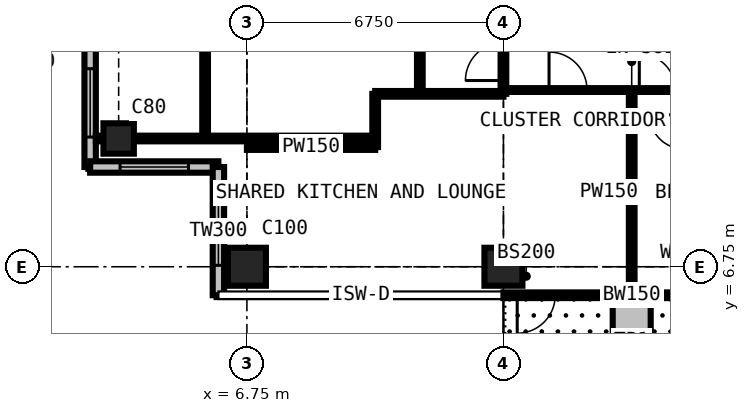
"""IFC4 building model, lengths in metres.
Left out: names, types, materials, properties, quantities, classifications, styles, units other than length and angle.
Written with IfcOpenShell. Run it as: python <this file> out.ifc"""

import sys

from ifc_helpers import new_model, si_unit, direction, frame, frame_2d, origin, origin_2d, place, context, subcontext, project, spatial, rectangle, extrude, element, fill, save


model = new_model("IFC4")
c1 = context("Model", 3, precision=1e-05, world=origin(), true_north=direction((0.0, 1.0)))
c2 = subcontext(c1, "Body", "Model", "MODEL_VIEW")
j1 = project(units=[si_unit("LENGTHUNIT", "METRE"), si_unit("PLANEANGLEUNIT", "RADIAN")], contexts=[c1])
p1 = place(None, origin())
s1 = spatial("IfcSite", under=j1, at=p1, CompositionType="ELEMENT")
p2 = place(p1, origin())
s2 = spatial("IfcBuilding", under=s1, at=p2, CompositionType="ELEMENT")
p3 = place(p2, frame((0.0, 0.0, 233.1)))
s3 = spatial("IfcBuildingStorey", under=s2, at=p3, CompositionType="ELEMENT", Elevation=233.1)
p4 = place(p3, frame((3.375, 10.125, 0.0), z_axis=(0.0, 0.0, 1.0), x_axis=(1.0, 0.0, 0.0)))
e1 = element("IfcColumn", 1, at=p4, inside=s3, PredefinedType="COLUMN", context=c2, shape_type="SweptSolid", body=[
    extrude(rectangle(XDim=0.8, YDim=0.8, at=origin_2d()), origin(), (0.0, 0.0, 1.0), 3.6),
])
for number, where, z_axis, x_axis in (
    (2, (6.75, 6.75, 0.0), (0.0, 0.0, 1.0), (1.0, 0.0, 0.0)),
    (3, (13.5, 6.75, 0.0), (0.0, 0.0, 1.0), (1.0, 0.0, 0.0)),
):
    element("IfcColumn", number, at=place(p3, frame(where, z_axis=z_axis, x_axis=x_axis)), inside=s3, PredefinedType="COLUMN", context=c2, shape_type="SweptSolid", body=[
        extrude(rectangle(XDim=1.0, YDim=1.0, at=origin_2d()), origin(), (0.0, 0.0, 1.0), 3.6),
    ])
p5 = place(p3, frame((2.625, 12.75, 0.0), z_axis=(0.0, 0.0, 1.0), x_axis=(0.0, -1.0, 0.0)))
e4 = element("IfcWall", 4, at=p5, inside=s3, PredefinedType="SOLIDWALL", context=c2, shape_type="SweptSolid", body=[
    extrude(rectangle(XDim=3.375, YDim=0.3, at=frame_2d((1.688, 0.0))), origin(), (0.0, 0.0, 1.0), 3.375),
])
p6 = place(p5, frame((0.788, 0.0, 0.6)))
e5 = element("IfcOpeningElement", 5, at=p6, cuts=e4, PredefinedType="OPENING", context=c2, shape_type="SweptSolid", body=[
    extrude(rectangle(XDim=1.8, YDim=2.1, at=frame_2d((0.9, 1.05))), frame((0.0, 0.16, 0.0), z_axis=(0.0, -1.0, 0.0), x_axis=(1.0, 0.0, 0.0)), (0.0, 0.0, 1.0), 0.32),
])
p7 = place(p3, frame((2.625, 9.375, 0.0), z_axis=(0.0, 0.0, 1.0), x_axis=(1.0, 0.0, 0.0)))
e6 = element("IfcWall", 6, at=p7, inside=s3, PredefinedType="SOLIDWALL", context=c2, shape_type="SweptSolid", body=[
    extrude(rectangle(XDim=3.375, YDim=0.3, at=frame_2d((1.688, 0.0))), origin(), (0.0, 0.0, 1.0), 3.375),
])
p8 = place(p7, frame((0.788, 0.0, 0.6)))
e7 = element("IfcOpeningElement", 7, at=p8, cuts=e6, PredefinedType="OPENING", context=c2, shape_type="SweptSolid", body=[
    extrude(rectangle(XDim=1.8, YDim=2.1, at=frame_2d((0.9, 1.05))), frame((0.0, 0.16, 0.0), z_axis=(0.0, -1.0, 0.0), x_axis=(1.0, 0.0, 0.0)), (0.0, 0.0, 1.0), 0.32),
])
p9 = place(p3, frame((6.0, 9.375, 0.0), z_axis=(0.0, 0.0, 1.0), x_axis=(0.0, -1.0, 0.0)))
e8 = element("IfcWall", 8, at=p9, inside=s3, PredefinedType="SOLIDWALL", context=c2, shape_type="SweptSolid", body=[
    extrude(rectangle(XDim=3.375, YDim=0.3, at=frame_2d((1.688, 0.0))), origin(), (0.0, 0.0, 1.0), 3.375),
])
p10 = place(p9, frame((0.788, 0.0, 0.6)))
e9 = element("IfcOpeningElement", 9, at=p10, cuts=e8, PredefinedType="OPENING", context=c2, shape_type="SweptSolid", body=[
    extrude(rectangle(XDim=1.8, YDim=2.1, at=frame_2d((0.9, 1.05))), frame((0.0, 0.16, 0.0), z_axis=(0.0, -1.0, 0.0), x_axis=(1.0, 0.0, 0.0)), (0.0, 0.0, 1.0), 0.32),
])
p11 = place(p3, frame((20.25, 6.0, 0.0), z_axis=(0.0, 0.0, 1.0), x_axis=(-1.0, 0.0, 0.0)))
e10 = element("IfcWall", 10, at=p11, inside=s3, PredefinedType="SOLIDWALL", context=c2, shape_type="SweptSolid", body=[
    extrude(rectangle(XDim=6.75, YDim=0.15, at=frame_2d((3.375, 0.0))), origin(), (0.0, 0.0, 1.0), 3.375),
])
p12 = place(p11, frame((0.363, 0.0, 0.0)))
e11 = element("IfcOpeningElement", 11, at=p12, cuts=e10, PredefinedType="OPENING", context=c2, shape_type="SweptSolid", body=[
    extrude(rectangle(XDim=1.0, YDim=2.2, at=frame_2d((0.5, 1.1))), frame((0.0, 0.085, 0.0), z_axis=(0.0, -1.0, 0.0), x_axis=(1.0, 0.0, 0.0)), (0.0, 0.0, 1.0), 0.17),
])
p13 = place(p11, frame((1.725, 0.0, 0.9)))
e12 = element("IfcOpeningElement", 12, at=p13, cuts=e10, PredefinedType="OPENING", context=c2, shape_type="SweptSolid", body=[
    extrude(rectangle(XDim=1.2, YDim=1.8, at=frame_2d((0.6, 0.9))), frame((0.0, 0.085, 0.0), z_axis=(0.0, -1.0, 0.0), x_axis=(1.0, 0.0, 0.0)), (0.0, 0.0, 1.0), 0.17),
])
p14 = place(p11, frame((5.387, 0.0, 0.0)))
e13 = element("IfcOpeningElement", 13, at=p14, cuts=e10, PredefinedType="OPENING", context=c2, shape_type="SweptSolid", body=[
    extrude(rectangle(XDim=1.0, YDim=2.2, at=frame_2d((0.5, 1.1))), frame((0.0, 0.085, 0.0), z_axis=(0.0, -1.0, 0.0), x_axis=(1.0, 0.0, 0.0)), (0.0, 0.0, 1.0), 0.17),
])
p15 = place(p11, frame((3.825, 0.0, 0.9)))
e14 = element("IfcOpeningElement", 14, at=p15, cuts=e10, PredefinedType="OPENING", context=c2, shape_type="SweptSolid", body=[
    extrude(rectangle(XDim=1.2, YDim=1.8, at=frame_2d((0.6, 0.9))), frame((0.0, 0.085, 0.0), z_axis=(0.0, -1.0, 0.0), x_axis=(1.0, 0.0, 0.0)), (0.0, 0.0, 1.0), 0.17),
])
p16 = place(p3, frame((16.875, 5.9, 0.0), z_axis=(0.0, 0.0, 1.0), x_axis=(0.0, -1.0, 0.0)))
e15 = element("IfcWall", 15, at=p16, inside=s3, PredefinedType="USERDEFINED", context=c2, shape_type="SweptSolid", body=[
    extrude(rectangle(XDim=2.2, YDim=1.0, at=frame_2d((1.1, 0.0))), origin(), (0.0, 0.0, 1.0), 0.9),
])
p17 = place(p3, frame((2.775, 10.125, 0.0), z_axis=(0.0, 0.0, 1.0), x_axis=(1.0, 0.0, 0.0)))
e16 = element("IfcWall", 16, at=p17, inside=s3, PredefinedType="PARTITIONING", context=c2, shape_type="SweptSolid", body=[
    extrude(rectangle(XDim=7.35, YDim=0.15, at=frame_2d((3.675, 0.0))), origin(), (0.0, 0.0, 1.0), 2.877),
])
p18 = place(p3, frame((5.65, 10.125, 0.0), z_axis=(0.0, 0.0, 1.0), x_axis=(0.0, 1.0, 0.0)))
e17 = element("IfcWall", 17, at=p18, inside=s3, PredefinedType="PARTITIONING", context=c2, shape_type="SweptSolid", body=[
    extrude(rectangle(XDim=10.762, YDim=0.15, at=frame_2d((5.381, 0.0))), origin(), (0.0, 0.0, 1.0), 3.375),
])
p19 = place(p18, frame((4.9, 0.0, 0.0)))
e18 = element("IfcOpeningElement", 18, at=p19, cuts=e17, PredefinedType="OPENING", context=c2, shape_type="SweptSolid", body=[
    extrude(rectangle(XDim=0.95, YDim=2.2, at=frame_2d((0.475, 1.1))), frame((0.0, 0.085, 0.0), z_axis=(0.0, -1.0, 0.0), x_axis=(1.0, 0.0, 0.0)), (0.0, 0.0, 1.0), 0.17),
])
p20 = place(p3, frame((6.75, 9.9, 0.0), z_axis=(0.0, 0.0, 1.0), x_axis=(1.0, 0.0, 0.0)))
e19 = element("IfcWall", 19, at=p20, inside=s3, PredefinedType="PARTITIONING", context=c2, shape_type="SweptSolid", body=[
    extrude(rectangle(XDim=3.375, YDim=0.15, at=frame_2d((1.688, 0.0))), origin(), (0.0, 0.0, 1.0), 3.375),
])
p21 = place(p3, frame((10.125, 9.9, 0.0), z_axis=(0.0, 0.0, 1.0), x_axis=(0.0, 1.0, 0.0)))
e20 = element("IfcWall", 20, at=p21, inside=s3, PredefinedType="PARTITIONING", context=c2, shape_type="SweptSolid", body=[
    extrude(rectangle(XDim=1.4, YDim=0.15, at=frame_2d((0.7, 0.0))), origin(), (0.0, 0.0, 1.0), 3.375),
])
p22 = place(p3, frame((10.125, 11.3, 0.0), z_axis=(0.0, 0.0, 1.0), x_axis=(1.0, 0.0, 0.0)))
e21 = element("IfcWall", 21, at=p22, inside=s3, PredefinedType="PARTITIONING", context=c2, shape_type="SweptSolid", body=[
    extrude(rectangle(XDim=3.375, YDim=0.15, at=frame_2d((1.688, 0.0))), origin(), (0.0, 0.0, 1.0), 3.375),
])
p23 = place(p3, frame((11.3, 11.3, 0.0), z_axis=(0.0, 0.0, 1.0), x_axis=(0.0, 1.0, 0.0)))
e22 = element("IfcWall", 22, at=p23, inside=s3, PredefinedType="PARTITIONING", context=c2, shape_type="SweptSolid", body=[
    extrude(rectangle(XDim=19.3, YDim=0.15, at=frame_2d((9.65, 0.0))), origin(), (0.0, 0.0, 1.0), 3.375),
])
p24 = place(p23, frame((18.1, 0.0, 0.0)))
e23 = element("IfcOpeningElement", 23, at=p24, cuts=e22, PredefinedType="OPENING", context=c2, shape_type="SweptSolid", body=[
    extrude(rectangle(XDim=1.0, YDim=2.2, at=frame_2d((0.5, 1.1))), frame((0.0, 0.085, 0.0), z_axis=(0.0, -1.0, 0.0), x_axis=(1.0, 0.0, 0.0)), (0.0, 0.0, 1.0), 0.17),
])
p25 = place(p23, frame((10.137, 0.0, 0.0)))
e24 = element("IfcOpeningElement", 24, at=p25, cuts=e22, PredefinedType="OPENING", context=c2, shape_type="SweptSolid", body=[
    extrude(rectangle(XDim=1.0, YDim=2.2, at=frame_2d((0.5, 1.1))), frame((0.0, 0.085, 0.0), z_axis=(0.0, -1.0, 0.0), x_axis=(1.0, 0.0, 0.0)), (0.0, 0.0, 1.0), 0.17),
])
p26 = place(p3, frame((13.5, 11.3, 0.0), z_axis=(0.0, 0.0, 1.0), x_axis=(0.0, 1.0, 0.0)))
e25 = element("IfcWall", 25, at=p26, inside=s3, PredefinedType="PARTITIONING", context=c2, shape_type="SweptSolid", body=[
    extrude(rectangle(XDim=1.6, YDim=0.15, at=frame_2d((0.8, 0.0))), origin(), (0.0, 0.0, 1.0), 2.877),
])
p27 = place(p26, frame((0.35, 0.0, 0.0)))
e26 = element("IfcOpeningElement", 26, at=p27, cuts=e25, PredefinedType="OPENING", context=c2, shape_type="SweptSolid", body=[
    extrude(rectangle(XDim=1.0, YDim=2.2, at=frame_2d((0.5, 1.1))), frame((0.0, 0.085, 0.0), z_axis=(0.0, -1.0, 0.0), x_axis=(1.0, 0.0, 0.0)), (0.0, 0.0, 1.0), 0.17),
])
p28 = place(p3, frame((13.5, 11.4, 0.0), z_axis=(0.0, 0.0, 1.0), x_axis=(1.0, 0.0, 0.0)))
e27 = element("IfcWall", 27, at=p28, inside=s3, PredefinedType="PARTITIONING", context=c2, shape_type="SweptSolid", body=[
    extrude(rectangle(XDim=10.125, YDim=0.1, at=frame_2d((5.062, 0.0))), origin(), (0.0, 0.0, 1.0), 3.375),
])
p29 = place(p28, frame((1.2, 0.0, 0.0)))
e28 = element("IfcOpeningElement", 28, at=p29, cuts=e27, PredefinedType="OPENING", context=c2, shape_type="SweptSolid", body=[
    extrude(rectangle(XDim=1.0, YDim=2.2, at=frame_2d((0.5, 1.1))), frame((0.0, 0.06, 0.0), z_axis=(0.0, -1.0, 0.0), x_axis=(1.0, 0.0, 0.0)), (0.0, 0.0, 1.0), 0.12),
])
p30 = place(p28, frame((3.575, 0.0, 0.0)))
e29 = element("IfcOpeningElement", 29, at=p30, cuts=e27, PredefinedType="OPENING", context=c2, shape_type="SweptSolid", body=[
    extrude(rectangle(XDim=0.95, YDim=2.2, at=frame_2d((0.475, 1.1))), frame((0.0, 0.06, 0.0), z_axis=(0.0, -1.0, 0.0), x_axis=(1.0, 0.0, 0.0)), (0.0, 0.0, 1.0), 0.12),
])
p31 = place(p28, frame((6.95, 0.0, 0.0)))
e30 = element("IfcOpeningElement", 30, at=p31, cuts=e27, PredefinedType="OPENING", context=c2, shape_type="SweptSolid", body=[
    extrude(rectangle(XDim=0.95, YDim=2.2, at=frame_2d((0.475, 1.1))), frame((0.0, 0.06, 0.0), z_axis=(0.0, -1.0, 0.0), x_axis=(1.0, 0.0, 0.0)), (0.0, 0.0, 1.0), 0.12),
])
p32 = place(p3, frame((16.875, 6.016, 0.0), z_axis=(0.0, 0.0, 1.0), x_axis=(0.0, 1.0, 0.0)))
e31 = element("IfcWall", 31, at=p32, inside=s3, PredefinedType="PARTITIONING", context=c2, shape_type="SweptSolid", body=[
    extrude(rectangle(XDim=5.384, YDim=0.15, at=frame_2d((2.692, 0.0))), origin(), (0.0, 0.0, 1.0), 3.375),
])
p33 = place(p6, origin())
e32 = element("IfcWindow", 32, at=p33, inside=s3, PartitioningType="SINGLE_PANEL", PredefinedType="WINDOW", context=c2, shape_type="SweptSolid", body=[
    extrude(rectangle(XDim=1.8, YDim=2.1, at=frame_2d((0.9, 1.05))), frame((0.0, 0.03, 0.0), z_axis=(0.0, -1.0, 0.0), x_axis=(1.0, 0.0, 0.0)), (0.0, 0.0, 1.0), 0.06),
])
fill(e5, e32)
p34 = place(p8, origin())
e33 = element("IfcWindow", 33, at=p34, inside=s3, PartitioningType="SINGLE_PANEL", PredefinedType="WINDOW", context=c2, shape_type="SweptSolid", body=[
    extrude(rectangle(XDim=1.8, YDim=2.1, at=frame_2d((0.9, 1.05))), frame((0.0, 0.03, 0.0), z_axis=(0.0, -1.0, 0.0), x_axis=(1.0, 0.0, 0.0)), (0.0, 0.0, 1.0), 0.06),
])
fill(e7, e33)
p35 = place(p10, origin())
e34 = element("IfcWindow", 34, at=p35, inside=s3, PartitioningType="SINGLE_PANEL", PredefinedType="WINDOW", context=c2, shape_type="SweptSolid", body=[
    extrude(rectangle(XDim=1.8, YDim=2.1, at=frame_2d((0.9, 1.05))), frame((0.0, 0.03, 0.0), z_axis=(0.0, -1.0, 0.0), x_axis=(1.0, 0.0, 0.0)), (0.0, 0.0, 1.0), 0.06),
])
fill(e9, e34)
p36 = place(p13, origin())
e35 = element("IfcWindow", 35, at=p36, inside=s3, PartitioningType="SINGLE_PANEL", PredefinedType="WINDOW", context=c2, shape_type="SweptSolid", body=[
    extrude(rectangle(XDim=1.2, YDim=1.8, at=frame_2d((0.6, 0.9))), frame((0.0, 0.03, 0.0), z_axis=(0.0, -1.0, 0.0), x_axis=(1.0, 0.0, 0.0)), (0.0, 0.0, 1.0), 0.06),
])
fill(e12, e35)
p37 = place(p14, origin())
e36 = element("IfcDoor", 36, at=p37, inside=s3, OperationType="SINGLE_SWING_RIGHT", PredefinedType="DOOR", context=c2, shape_type="SweptSolid", body=[
    extrude(rectangle(XDim=1.0, YDim=2.2, at=frame_2d((0.5, 1.1))), frame((0.0, 0.025, 0.0), z_axis=(0.0, -1.0, 0.0), x_axis=(1.0, 0.0, 0.0)), (0.0, 0.0, 1.0), 0.05),
])
fill(e13, e36)
p38 = place(p15, origin())
e37 = element("IfcWindow", 37, at=p38, inside=s3, PartitioningType="SINGLE_PANEL", PredefinedType="WINDOW", context=c2, shape_type="SweptSolid", body=[
    extrude(rectangle(XDim=1.2, YDim=1.8, at=frame_2d((0.6, 0.9))), frame((0.0, 0.03, 0.0), z_axis=(0.0, -1.0, 0.0), x_axis=(1.0, 0.0, 0.0)), (0.0, 0.0, 1.0), 0.06),
])
fill(e14, e37)
p39 = place(p29, origin())
e38 = element("IfcDoor", 38, at=p39, inside=s3, OperationType="SINGLE_SWING_LEFT", PredefinedType="DOOR", context=c2, shape_type="SweptSolid", body=[
    extrude(rectangle(XDim=1.0, YDim=2.2, at=frame_2d((0.5, 1.1))), frame((0.0, 0.025, 0.0), z_axis=(0.0, -1.0, 0.0), x_axis=(1.0, 0.0, 0.0)), (0.0, 0.0, 1.0), 0.05),
])
fill(e28, e38)
p40 = place(p30, origin())
e39 = element("IfcDoor", 39, at=p40, inside=s3, OperationType="SINGLE_SWING_LEFT", PredefinedType="DOOR", context=c2, shape_type="SweptSolid", body=[
    extrude(rectangle(XDim=0.95, YDim=2.2, at=frame_2d((0.475, 1.1))), frame((0.0, 0.025, 0.0), z_axis=(0.0, -1.0, 0.0), x_axis=(1.0, 0.0, 0.0)), (0.0, 0.0, 1.0), 0.05),
])
fill(e29, e39)
p41 = place(p27, origin())
e40 = element("IfcDoor", 40, at=p41, inside=s3, OperationType="SINGLE_SWING_LEFT", PredefinedType="DOOR", context=c2, shape_type="SweptSolid", body=[
    extrude(rectangle(XDim=1.0, YDim=2.2, at=frame_2d((0.5, 1.1))), frame((0.0, 0.025, 0.0), z_axis=(0.0, -1.0, 0.0), x_axis=(1.0, 0.0, 0.0)), (0.0, 0.0, 1.0), 0.05),
])
fill(e26, e40)
save(model, sys.argv[1])
